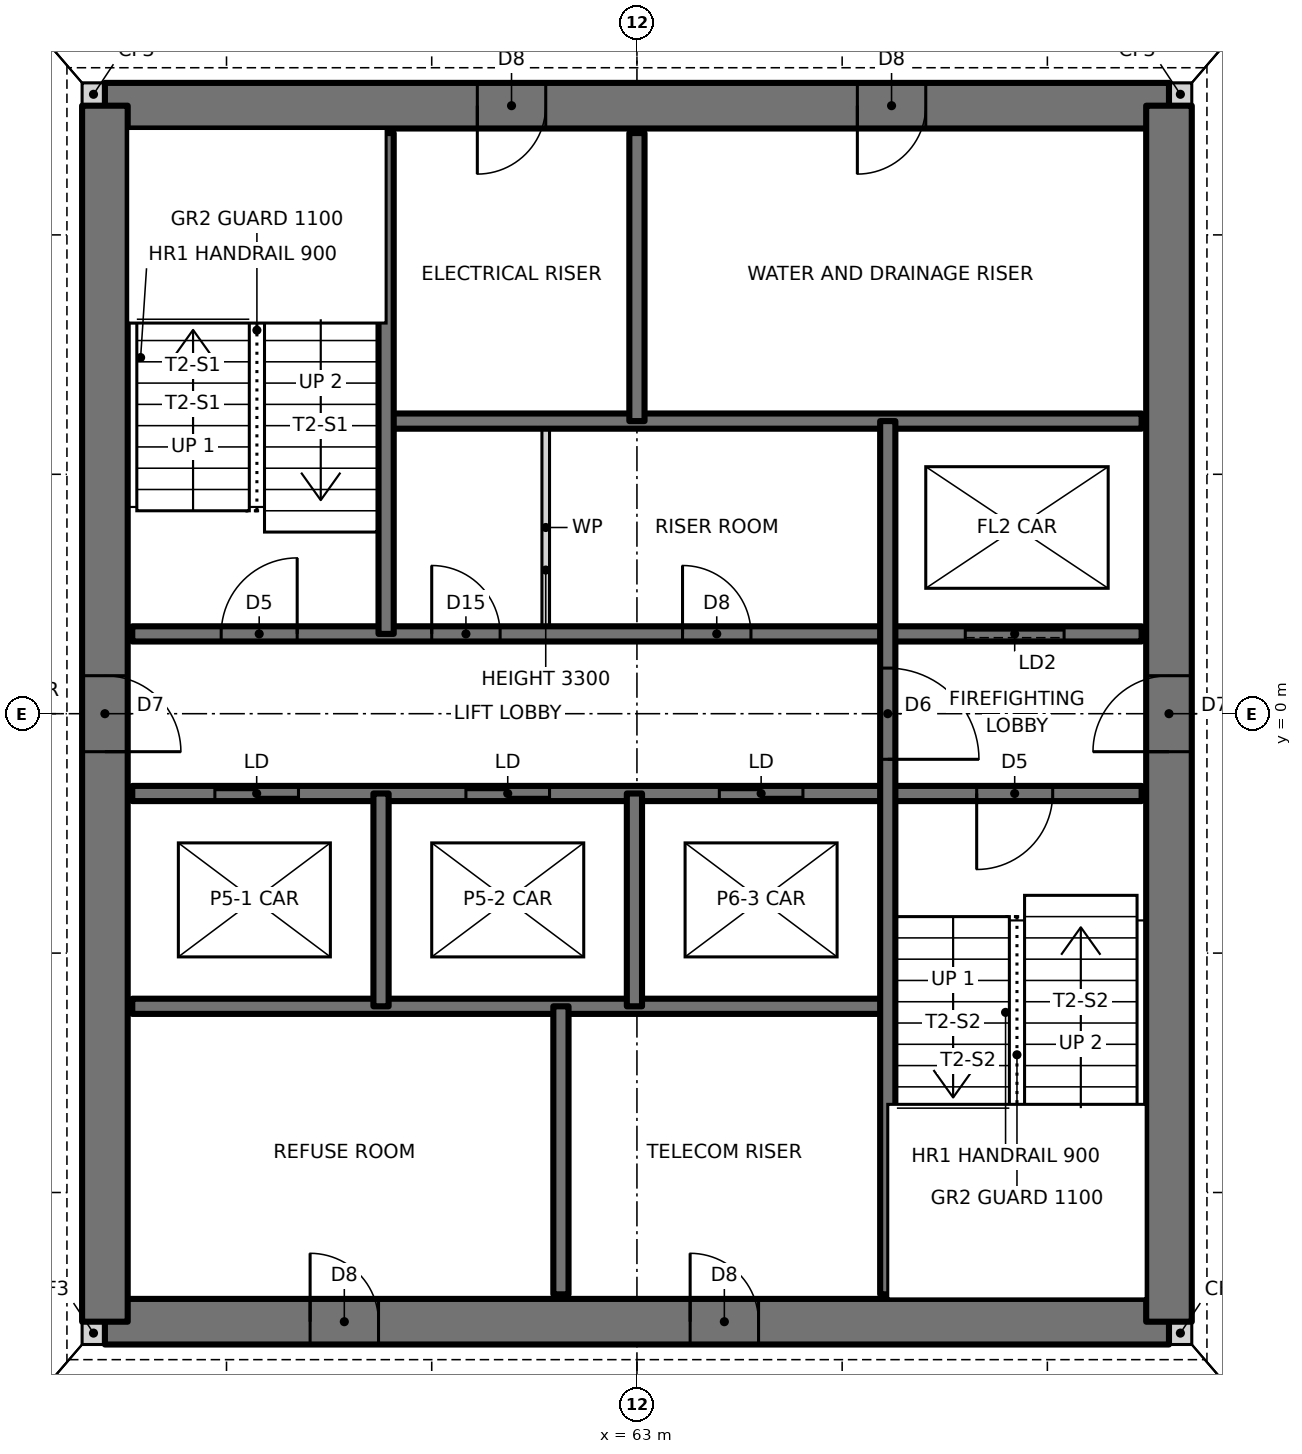
"""IFC4 building model, lengths in metres.
Left out: names, types, materials, properties, quantities, classifications, styles, units other than length and angle.
Written with IfcOpenShell. Run it as: python <this file> out.ifc"""

import sys

from ifc_helpers import new_model, si_unit, direction, frame, frame_2d, origin, place, context, subcontext, project, spatial, rectangle, extrude, element, fill, save


model = new_model("IFC4")
c1 = context("Model", 3, precision=1e-05, world=origin(), true_north=direction((0.0, 1.0)))
c2 = subcontext(c1, "Body", "Model", "MODEL_VIEW")
j1 = project(units=[si_unit("LENGTHUNIT", "METRE"), si_unit("PLANEANGLEUNIT", "RADIAN")], contexts=[c1])
p1 = place(None, origin())
s1 = spatial("IfcSite", under=j1, at=p1, CompositionType="ELEMENT")
p2 = place(p1, origin())
s2 = spatial("IfcBuilding", under=s1, at=p2, CompositionType="ELEMENT")
p3 = place(p2, frame((0.0, 0.0, 57.0)))
s3 = spatial("IfcBuildingStorey", under=s2, at=p3, CompositionType="ELEMENT", Elevation=57.0)
for number, where, z_axis, x_axis in (
    (1, (55.7, -8.15, 0.0), (0.0, 0.0, 1.0), (1.0, 0.0, 0.0)),
    (2, (70.0, -8.15, 0.0), (0.0, 0.0, 1.0), (1.0, 0.0, 0.0)),
    (3, (70.0, 8.15, 0.0), (0.0, 0.0, 1.0), (1.0, 0.0, 0.0)),
    (4, (55.7, 8.15, 0.0), (0.0, 0.0, 1.0), (1.0, 0.0, 0.0)),
):
    element("IfcWall", number, at=place(p3, frame(where, z_axis=z_axis, x_axis=x_axis)), inside=s3, PredefinedType="SOLIDWALL", context=c2, shape_type="SweptSolid", body=[
        extrude(rectangle(XDim=0.3, YDim=0.3, at=frame_2d((0.15, 0.0))), origin(), (0.0, 0.0, 1.0), 3.5),
    ])
p4 = place(p3, frame((56.0, -8.0, 0.0), z_axis=(0.0, 0.0, 1.0), x_axis=(1.0, 0.0, 0.0)))
e5 = element("IfcWall", 5, at=p4, inside=s3, PredefinedType="SHEAR", context=c2, shape_type="SweptSolid", body=[
    extrude(rectangle(XDim=14.0, YDim=0.6, at=frame_2d((7.0, 0.0))), origin(), (0.0, 0.0, 1.0), 3.5),
])
p5 = place(p4, frame((2.7, 0.0, 0.0)))
e6 = element("IfcOpeningElement", 6, at=p5, cuts=e5, PredefinedType="OPENING", context=c2, shape_type="SweptSolid", body=[
    extrude(rectangle(XDim=0.9, YDim=2.1, at=frame_2d((0.45, 1.05))), frame((0.0, 0.31, 0.0), z_axis=(0.0, -1.0, 0.0), x_axis=(1.0, 0.0, 0.0)), (0.0, 0.0, 1.0), 0.62),
])
p6 = place(p4, frame((7.7, 0.0, 0.0)))
e7 = element("IfcOpeningElement", 7, at=p6, cuts=e5, PredefinedType="OPENING", context=c2, shape_type="SweptSolid", body=[
    extrude(rectangle(XDim=0.9, YDim=2.1, at=frame_2d((0.45, 1.05))), frame((0.0, 0.31, 0.0), z_axis=(0.0, -1.0, 0.0), x_axis=(1.0, 0.0, 0.0)), (0.0, 0.0, 1.0), 0.62),
])
p7 = place(p3, frame((70.0, 8.0, 0.0), z_axis=(0.0, 0.0, 1.0), x_axis=(-1.0, 0.0, 0.0)))
e8 = element("IfcWall", 8, at=p7, inside=s3, PredefinedType="SHEAR", context=c2, shape_type="SweptSolid", body=[
    extrude(rectangle(XDim=14.0, YDim=0.6, at=frame_2d((7.0, 0.0))), origin(), (0.0, 0.0, 1.0), 3.5),
])
p8 = place(p7, frame((8.2, 0.0, 0.0)))
e9 = element("IfcOpeningElement", 9, at=p8, cuts=e8, PredefinedType="OPENING", context=c2, shape_type="SweptSolid", body=[
    extrude(rectangle(XDim=0.9, YDim=2.1, at=frame_2d((0.45, 1.05))), frame((0.0, 0.31, 0.0), z_axis=(0.0, -1.0, 0.0), x_axis=(1.0, 0.0, 0.0)), (0.0, 0.0, 1.0), 0.62),
])
p9 = place(p7, frame((3.2, 0.0, 0.0)))
e10 = element("IfcOpeningElement", 10, at=p9, cuts=e8, PredefinedType="OPENING", context=c2, shape_type="SweptSolid", body=[
    extrude(rectangle(XDim=0.9, YDim=2.1, at=frame_2d((0.45, 1.05))), frame((0.0, 0.31, 0.0), z_axis=(0.0, -1.0, 0.0), x_axis=(1.0, 0.0, 0.0)), (0.0, 0.0, 1.0), 0.62),
])
p10 = place(p3, frame((70.0, -8.0, 0.0), z_axis=(0.0, 0.0, 1.0), x_axis=(0.0, 1.0, 0.0)))
e11 = element("IfcWall", 11, at=p10, inside=s3, PredefinedType="SHEAR", context=c2, shape_type="SweptSolid", body=[
    extrude(rectangle(XDim=16.0, YDim=0.6, at=frame_2d((8.0, 0.0))), origin(), (0.0, 0.0, 1.0), 3.5),
])
p11 = place(p10, frame((7.5, 0.0, 0.0)))
e12 = element("IfcOpeningElement", 12, at=p11, cuts=e11, PredefinedType="OPENING", context=c2, shape_type="SweptSolid", body=[
    extrude(rectangle(XDim=1.0, YDim=2.1, at=frame_2d((0.5, 1.05))), frame((0.0, 0.31, 0.0), z_axis=(0.0, -1.0, 0.0), x_axis=(1.0, 0.0, 0.0)), (0.0, 0.0, 1.0), 0.62),
])
p12 = place(p3, frame((56.0, 8.0, 0.0), z_axis=(0.0, 0.0, 1.0), x_axis=(0.0, -1.0, 0.0)))
e13 = element("IfcWall", 13, at=p12, inside=s3, PredefinedType="SHEAR", context=c2, shape_type="SweptSolid", body=[
    extrude(rectangle(XDim=16.0, YDim=0.6, at=frame_2d((8.0, 0.0))), origin(), (0.0, 0.0, 1.0), 3.5),
])
p13 = place(p12, frame((7.5, 0.0, 0.0)))
e14 = element("IfcOpeningElement", 14, at=p13, cuts=e13, PredefinedType="OPENING", context=c2, shape_type="SweptSolid", body=[
    extrude(rectangle(XDim=1.0, YDim=2.1, at=frame_2d((0.5, 1.05))), frame((0.0, 0.31, 0.0), z_axis=(0.0, -1.0, 0.0), x_axis=(1.0, 0.0, 0.0)), (0.0, 0.0, 1.0), 0.62),
])
p14 = place(p3, frame((56.36, -3.85, 0.0), z_axis=(0.0, 0.0, 1.0), x_axis=(1.0, 0.0, 0.0)))
e15 = element("IfcWall", 15, at=p14, inside=s3, PredefinedType="SOLIDWALL", context=c2, shape_type="SweptSolid", body=[
    extrude(rectangle(XDim=9.94, YDim=0.2, at=frame_2d((4.97, 0.0))), origin(), (0.0, 0.0, 1.0), 3.5),
])
p15 = place(p3, frame((56.36, -1.05, 0.0), z_axis=(0.0, 0.0, 1.0), x_axis=(1.0, 0.0, 0.0)))
e16 = element("IfcWall", 16, at=p15, inside=s3, PredefinedType="SOLIDWALL", context=c2, shape_type="SweptSolid", body=[
    extrude(rectangle(XDim=13.28, YDim=0.2, at=frame_2d((6.64, 0.0))), origin(), (0.0, 0.0, 1.0), 3.5),
])
p16 = place(p15, frame((11.11, 0.0, 0.0)))
e17 = element("IfcOpeningElement", 17, at=p16, cuts=e16, PredefinedType="OPENING", context=c2, shape_type="SweptSolid", body=[
    extrude(rectangle(XDim=1.0, YDim=2.1, at=frame_2d((0.5, 1.05))), frame((0.0, 0.11, 0.0), z_axis=(0.0, -1.0, 0.0), x_axis=(1.0, 0.0, 0.0)), (0.0, 0.0, 1.0), 0.22),
])
p17 = place(p15, frame((1.087, 0.0, 0.0)))
e18 = element("IfcOpeningElement", 18, at=p17, cuts=e16, PredefinedType="OPENING", context=c2, shape_type="SweptSolid", body=[
    extrude(rectangle(XDim=1.1, YDim=2.1, at=frame_2d((0.55, 1.05))), frame((0.0, 0.11, 0.0), z_axis=(0.0, -1.0, 0.0), x_axis=(1.0, 0.0, 0.0)), (0.0, 0.0, 1.0), 0.22),
])
p18 = place(p15, frame((4.39, 0.0, 0.0)))
e19 = element("IfcOpeningElement", 19, at=p18, cuts=e16, PredefinedType="OPENING", context=c2, shape_type="SweptSolid", body=[
    extrude(rectangle(XDim=1.1, YDim=2.1, at=frame_2d((0.55, 1.05))), frame((0.0, 0.11, 0.0), z_axis=(0.0, -1.0, 0.0), x_axis=(1.0, 0.0, 0.0)), (0.0, 0.0, 1.0), 0.22),
])
p19 = place(p15, frame((7.724, 0.0, 0.0)))
e20 = element("IfcOpeningElement", 20, at=p19, cuts=e16, PredefinedType="OPENING", context=c2, shape_type="SweptSolid", body=[
    extrude(rectangle(XDim=1.1, YDim=2.1, at=frame_2d((0.55, 1.05))), frame((0.0, 0.11, 0.0), z_axis=(0.0, -1.0, 0.0), x_axis=(1.0, 0.0, 0.0)), (0.0, 0.0, 1.0), 0.22),
])
p20 = place(p3, frame((56.36, 1.05, 0.0), z_axis=(0.0, 0.0, 1.0), x_axis=(1.0, 0.0, 0.0)))
e21 = element("IfcWall", 21, at=p20, inside=s3, PredefinedType="SOLIDWALL", context=c2, shape_type="SweptSolid", body=[
    extrude(rectangle(XDim=13.28, YDim=0.2, at=frame_2d((6.64, 0.0))), origin(), (0.0, 0.0, 1.0), 3.5),
])
p21 = place(p20, frame((1.17, 0.0, 0.0)))
e22 = element("IfcOpeningElement", 22, at=p21, cuts=e21, PredefinedType="OPENING", context=c2, shape_type="SweptSolid", body=[
    extrude(rectangle(XDim=1.0, YDim=2.1, at=frame_2d((0.5, 1.05))), frame((0.0, 0.11, 0.0), z_axis=(0.0, -1.0, 0.0), x_axis=(1.0, 0.0, 0.0)), (0.0, 0.0, 1.0), 0.22),
])
p22 = place(p20, frame((7.24, 0.0, 0.0)))
e23 = element("IfcOpeningElement", 23, at=p22, cuts=e21, PredefinedType="OPENING", context=c2, shape_type="SweptSolid", body=[
    extrude(rectangle(XDim=0.9, YDim=2.1, at=frame_2d((0.45, 1.05))), frame((0.0, 0.11, 0.0), z_axis=(0.0, -1.0, 0.0), x_axis=(1.0, 0.0, 0.0)), (0.0, 0.0, 1.0), 0.22),
])
p23 = place(p20, frame((3.94, 0.0, 0.0)))
e24 = element("IfcOpeningElement", 24, at=p23, cuts=e21, PredefinedType="OPENING", context=c2, shape_type="SweptSolid", body=[
    extrude(rectangle(XDim=0.9, YDim=2.1, at=frame_2d((0.45, 1.05))), frame((0.0, 0.11, 0.0), z_axis=(0.0, -1.0, 0.0), x_axis=(1.0, 0.0, 0.0)), (0.0, 0.0, 1.0), 0.22),
])
p24 = place(p20, frame((10.96, 0.0, 0.0)))
e25 = element("IfcOpeningElement", 25, at=p24, cuts=e21, PredefinedType="OPENING", context=c2, shape_type="SweptSolid", body=[
    extrude(rectangle(XDim=1.3, YDim=2.1, at=frame_2d((0.65, 1.05))), frame((0.0, 0.11, 0.0), z_axis=(0.0, -1.0, 0.0), x_axis=(1.0, 0.0, 0.0)), (0.0, 0.0, 1.0), 0.22),
])
p25 = place(p3, frame((59.7, 3.85, 0.0), z_axis=(0.0, 0.0, 1.0), x_axis=(1.0, 0.0, 0.0)))
e26 = element("IfcWall", 26, at=p25, inside=s3, PredefinedType="SOLIDWALL", context=c2, shape_type="SweptSolid", body=[
    extrude(rectangle(XDim=9.94, YDim=0.2, at=frame_2d((4.97, 0.0))), origin(), (0.0, 0.0, 1.0), 3.5),
])
p26 = place(p3, frame((66.3, -7.64, 0.0), z_axis=(0.0, 0.0, 1.0), x_axis=(0.0, 1.0, 0.0)))
e27 = element("IfcWall", 27, at=p26, inside=s3, PredefinedType="SOLIDWALL", context=c2, shape_type="SweptSolid", body=[
    extrude(rectangle(XDim=11.49, YDim=0.2, at=frame_2d((5.745, 0.0))), origin(), (0.0, 0.0, 1.0), 3.5),
])
p27 = place(p26, frame((7.04, 0.0, 0.0)))
e28 = element("IfcOpeningElement", 28, at=p27, cuts=e27, PredefinedType="OPENING", context=c2, shape_type="SweptSolid", body=[
    extrude(rectangle(XDim=1.2, YDim=2.1, at=frame_2d((0.6, 1.05))), frame((0.0, 0.11, 0.0), z_axis=(0.0, -1.0, 0.0), x_axis=(1.0, 0.0, 0.0)), (0.0, 0.0, 1.0), 0.22),
])
p28 = place(p3, frame((63.0, 3.85, 0.0), z_axis=(0.0, 0.0, 1.0), x_axis=(0.0, 1.0, 0.0)))
e29 = element("IfcWall", 29, at=p28, inside=s3, PredefinedType="SOLIDWALL", context=c2, shape_type="SweptSolid", body=[
    extrude(rectangle(XDim=3.79, YDim=0.2, at=frame_2d((1.895, 0.0))), origin(), (0.0, 0.0, 1.0), 3.5),
])
p29 = place(p3, frame((62.967, -3.85, 0.0), z_axis=(0.0, 0.0, 1.0), x_axis=(0.0, 1.0, 0.0)))
e30 = element("IfcWall", 30, at=p29, inside=s3, PredefinedType="SOLIDWALL", context=c2, shape_type="SweptSolid", body=[
    extrude(rectangle(XDim=2.8, YDim=0.2, at=frame_2d((1.4, 0.0))), origin(), (0.0, 0.0, 1.0), 3.5),
])
p30 = place(p3, frame((62.0, -7.64, 0.0), z_axis=(0.0, 0.0, 1.0), x_axis=(0.0, 1.0, 0.0)))
e31 = element("IfcWall", 31, at=p30, inside=s3, PredefinedType="SOLIDWALL", context=c2, shape_type="SweptSolid", body=[
    extrude(rectangle(XDim=3.79, YDim=0.2, at=frame_2d((1.895, 0.0))), origin(), (0.0, 0.0, 1.0), 3.5),
])
p31 = place(p3, frame((61.8, 1.05, 0.0), z_axis=(0.0, 0.0, 1.0), x_axis=(0.0, 1.0, 0.0)))
e32 = element("IfcWall", 32, at=p31, inside=s3, PredefinedType="PARTITIONING", context=c2, shape_type="SweptSolid", body=[
    extrude(rectangle(XDim=2.8, YDim=0.1, at=frame_2d((1.4, 0.0))), origin(), (0.0, 0.0, 1.0), 3.3),
])
p32 = place(p3, frame((59.7, 1.05, 0.0), z_axis=(0.0, 0.0, 1.0), x_axis=(0.0, 1.0, 0.0)))
e33 = element("IfcWall", 33, at=p32, inside=s3, PredefinedType="SOLIDWALL", context=c2, shape_type="SweptSolid", body=[
    extrude(rectangle(XDim=6.59, YDim=0.2, at=frame_2d((3.295, 0.0))), origin(), (0.0, 0.0, 1.0), 3.5),
])
p33 = place(p3, frame((59.633, -3.85, 0.0), z_axis=(0.0, 0.0, 1.0), x_axis=(0.0, 1.0, 0.0)))
e34 = element("IfcWall", 34, at=p33, inside=s3, PredefinedType="SOLIDWALL", context=c2, shape_type="SweptSolid", body=[
    extrude(rectangle(XDim=2.8, YDim=0.2, at=frame_2d((1.4, 0.0))), origin(), (0.0, 0.0, 1.0), 3.5),
])
p34 = place(p21, origin())
e35 = element("IfcDoor", 35, at=p34, inside=s3, OperationType="SINGLE_SWING_RIGHT", PredefinedType="DOOR", context=c2, shape_type="SweptSolid", body=[
    extrude(rectangle(XDim=1.0, YDim=2.1, at=frame_2d((0.5, 1.05))), frame((0.0, 0.025, 0.0), z_axis=(0.0, -1.0, 0.0), x_axis=(1.0, 0.0, 0.0)), (0.0, 0.0, 1.0), 0.05),
])
fill(e22, e35)
p35 = place(p16, frame((1.0, 0.0, 0.0), z_axis=(0.0, 0.0, 1.0), x_axis=(-1.0, 0.0, 0.0)))
e36 = element("IfcDoor", 36, at=p35, inside=s3, OperationType="SINGLE_SWING_RIGHT", PredefinedType="DOOR", context=c2, shape_type="SweptSolid", body=[
    extrude(rectangle(XDim=1.0, YDim=2.1, at=frame_2d((0.5, 1.05))), frame((0.0, 0.025, 0.0), z_axis=(0.0, -1.0, 0.0), x_axis=(1.0, 0.0, 0.0)), (0.0, 0.0, 1.0), 0.05),
])
fill(e17, e36)
p36 = place(p27, frame((1.2, 0.0, 0.0), z_axis=(0.0, 0.0, 1.0), x_axis=(-1.0, 0.0, 0.0)))
e37 = element("IfcDoor", 37, at=p36, inside=s3, OperationType="SINGLE_SWING_RIGHT", PredefinedType="DOOR", context=c2, shape_type="SweptSolid", body=[
    extrude(rectangle(XDim=1.2, YDim=2.1, at=frame_2d((0.6, 1.05))), frame((0.0, 0.025, 0.0), z_axis=(0.0, -1.0, 0.0), x_axis=(1.0, 0.0, 0.0)), (0.0, 0.0, 1.0), 0.05),
])
fill(e28, e37)
p37 = place(p22, origin())
e38 = element("IfcDoor", 38, at=p37, inside=s3, OperationType="SINGLE_SWING_LEFT", PredefinedType="DOOR", context=c2, shape_type="SweptSolid", body=[
    extrude(rectangle(XDim=0.9, YDim=2.1, at=frame_2d((0.45, 1.05))), frame((0.0, 0.025, 0.0), z_axis=(0.0, -1.0, 0.0), x_axis=(1.0, 0.0, 0.0)), (0.0, 0.0, 1.0), 0.05),
])
fill(e23, e38)
p38 = place(p23, origin())
e39 = element("IfcDoor", 39, at=p38, inside=s3, OperationType="SINGLE_SWING_LEFT", PredefinedType="DOOR", context=c2, shape_type="SweptSolid", body=[
    extrude(rectangle(XDim=0.9, YDim=2.1, at=frame_2d((0.45, 1.05))), frame((0.0, 0.025, 0.0), z_axis=(0.0, -1.0, 0.0), x_axis=(1.0, 0.0, 0.0)), (0.0, 0.0, 1.0), 0.05),
])
fill(e24, e39)
p39 = place(p13, origin())
e40 = element("IfcDoor", 40, at=p39, inside=s3, OperationType="SINGLE_SWING_RIGHT", PredefinedType="DOOR", context=c2, shape_type="SweptSolid", body=[
    extrude(rectangle(XDim=1.0, YDim=2.1, at=frame_2d((0.5, 1.05))), frame((0.0, 0.025, 0.0), z_axis=(0.0, -1.0, 0.0), x_axis=(1.0, 0.0, 0.0)), (0.0, 0.0, 1.0), 0.05),
])
fill(e14, e40)
p40 = place(p11, origin())
e41 = element("IfcDoor", 41, at=p40, inside=s3, OperationType="SINGLE_SWING_LEFT", PredefinedType="DOOR", context=c2, shape_type="SweptSolid", body=[
    extrude(rectangle(XDim=1.0, YDim=2.1, at=frame_2d((0.5, 1.05))), frame((0.0, 0.025, 0.0), z_axis=(0.0, -1.0, 0.0), x_axis=(1.0, 0.0, 0.0)), (0.0, 0.0, 1.0), 0.05),
])
fill(e12, e41)
p41 = place(p8, origin())
e42 = element("IfcDoor", 42, at=p41, inside=s3, OperationType="SINGLE_SWING_RIGHT", PredefinedType="DOOR", context=c2, shape_type="SweptSolid", body=[
    extrude(rectangle(XDim=0.9, YDim=2.1, at=frame_2d((0.45, 1.05))), frame((0.0, 0.025, 0.0), z_axis=(0.0, -1.0, 0.0), x_axis=(1.0, 0.0, 0.0)), (0.0, 0.0, 1.0), 0.05),
])
fill(e9, e42)
p42 = place(p9, origin())
e43 = element("IfcDoor", 43, at=p42, inside=s3, OperationType="SINGLE_SWING_RIGHT", PredefinedType="DOOR", context=c2, shape_type="SweptSolid", body=[
    extrude(rectangle(XDim=0.9, YDim=2.1, at=frame_2d((0.45, 1.05))), frame((0.0, 0.025, 0.0), z_axis=(0.0, -1.0, 0.0), x_axis=(1.0, 0.0, 0.0)), (0.0, 0.0, 1.0), 0.05),
])
fill(e10, e43)
p43 = place(p5, origin())
e44 = element("IfcDoor", 44, at=p43, inside=s3, OperationType="SINGLE_SWING_LEFT", PredefinedType="DOOR", context=c2, shape_type="SweptSolid", body=[
    extrude(rectangle(XDim=0.9, YDim=2.1, at=frame_2d((0.45, 1.05))), frame((0.0, 0.025, 0.0), z_axis=(0.0, -1.0, 0.0), x_axis=(1.0, 0.0, 0.0)), (0.0, 0.0, 1.0), 0.05),
])
fill(e6, e44)
p44 = place(p6, origin())
e45 = element("IfcDoor", 45, at=p44, inside=s3, OperationType="SINGLE_SWING_LEFT", PredefinedType="DOOR", context=c2, shape_type="SweptSolid", body=[
    extrude(rectangle(XDim=0.9, YDim=2.1, at=frame_2d((0.45, 1.05))), frame((0.0, 0.025, 0.0), z_axis=(0.0, -1.0, 0.0), x_axis=(1.0, 0.0, 0.0)), (0.0, 0.0, 1.0), 0.05),
])
fill(e7, e45)
p45 = place(p17, origin())
e46 = element("IfcDoor", 46, at=p45, inside=s3, OperationType="DOUBLE_DOOR_SLIDING", PredefinedType="DOOR", context=c2, shape_type="SweptSolid", body=[
    extrude(rectangle(XDim=1.1, YDim=2.1, at=frame_2d((0.55, 1.05))), frame((0.0, 0.025, 0.0), z_axis=(0.0, -1.0, 0.0), x_axis=(1.0, 0.0, 0.0)), (0.0, 0.0, 1.0), 0.05),
])
fill(e18, e46)
p46 = place(p18, origin())
e47 = element("IfcDoor", 47, at=p46, inside=s3, OperationType="DOUBLE_DOOR_SLIDING", PredefinedType="DOOR", context=c2, shape_type="SweptSolid", body=[
    extrude(rectangle(XDim=1.1, YDim=2.1, at=frame_2d((0.55, 1.05))), frame((0.0, 0.025, 0.0), z_axis=(0.0, -1.0, 0.0), x_axis=(1.0, 0.0, 0.0)), (0.0, 0.0, 1.0), 0.05),
])
fill(e19, e47)
p47 = place(p19, origin())
e48 = element("IfcDoor", 48, at=p47, inside=s3, OperationType="DOUBLE_DOOR_SLIDING", PredefinedType="DOOR", context=c2, shape_type="SweptSolid", body=[
    extrude(rectangle(XDim=1.1, YDim=2.1, at=frame_2d((0.55, 1.05))), frame((0.0, 0.025, 0.0), z_axis=(0.0, -1.0, 0.0), x_axis=(1.0, 0.0, 0.0)), (0.0, 0.0, 1.0), 0.05),
])
fill(e20, e48)
p48 = place(p24, origin())
e49 = element("IfcDoor", 49, at=p48, inside=s3, OperationType="SLIDING_TO_LEFT", PredefinedType="DOOR", context=c2, shape_type="SweptSolid", body=[
    extrude(rectangle(XDim=1.3, YDim=2.1, at=frame_2d((0.65, 1.05))), frame((0.0, 0.025, 0.0), z_axis=(0.0, -1.0, 0.0), x_axis=(1.0, 0.0, 0.0)), (0.0, 0.0, 1.0), 0.05),
])
fill(e25, e49)
save(model, sys.argv[1])
